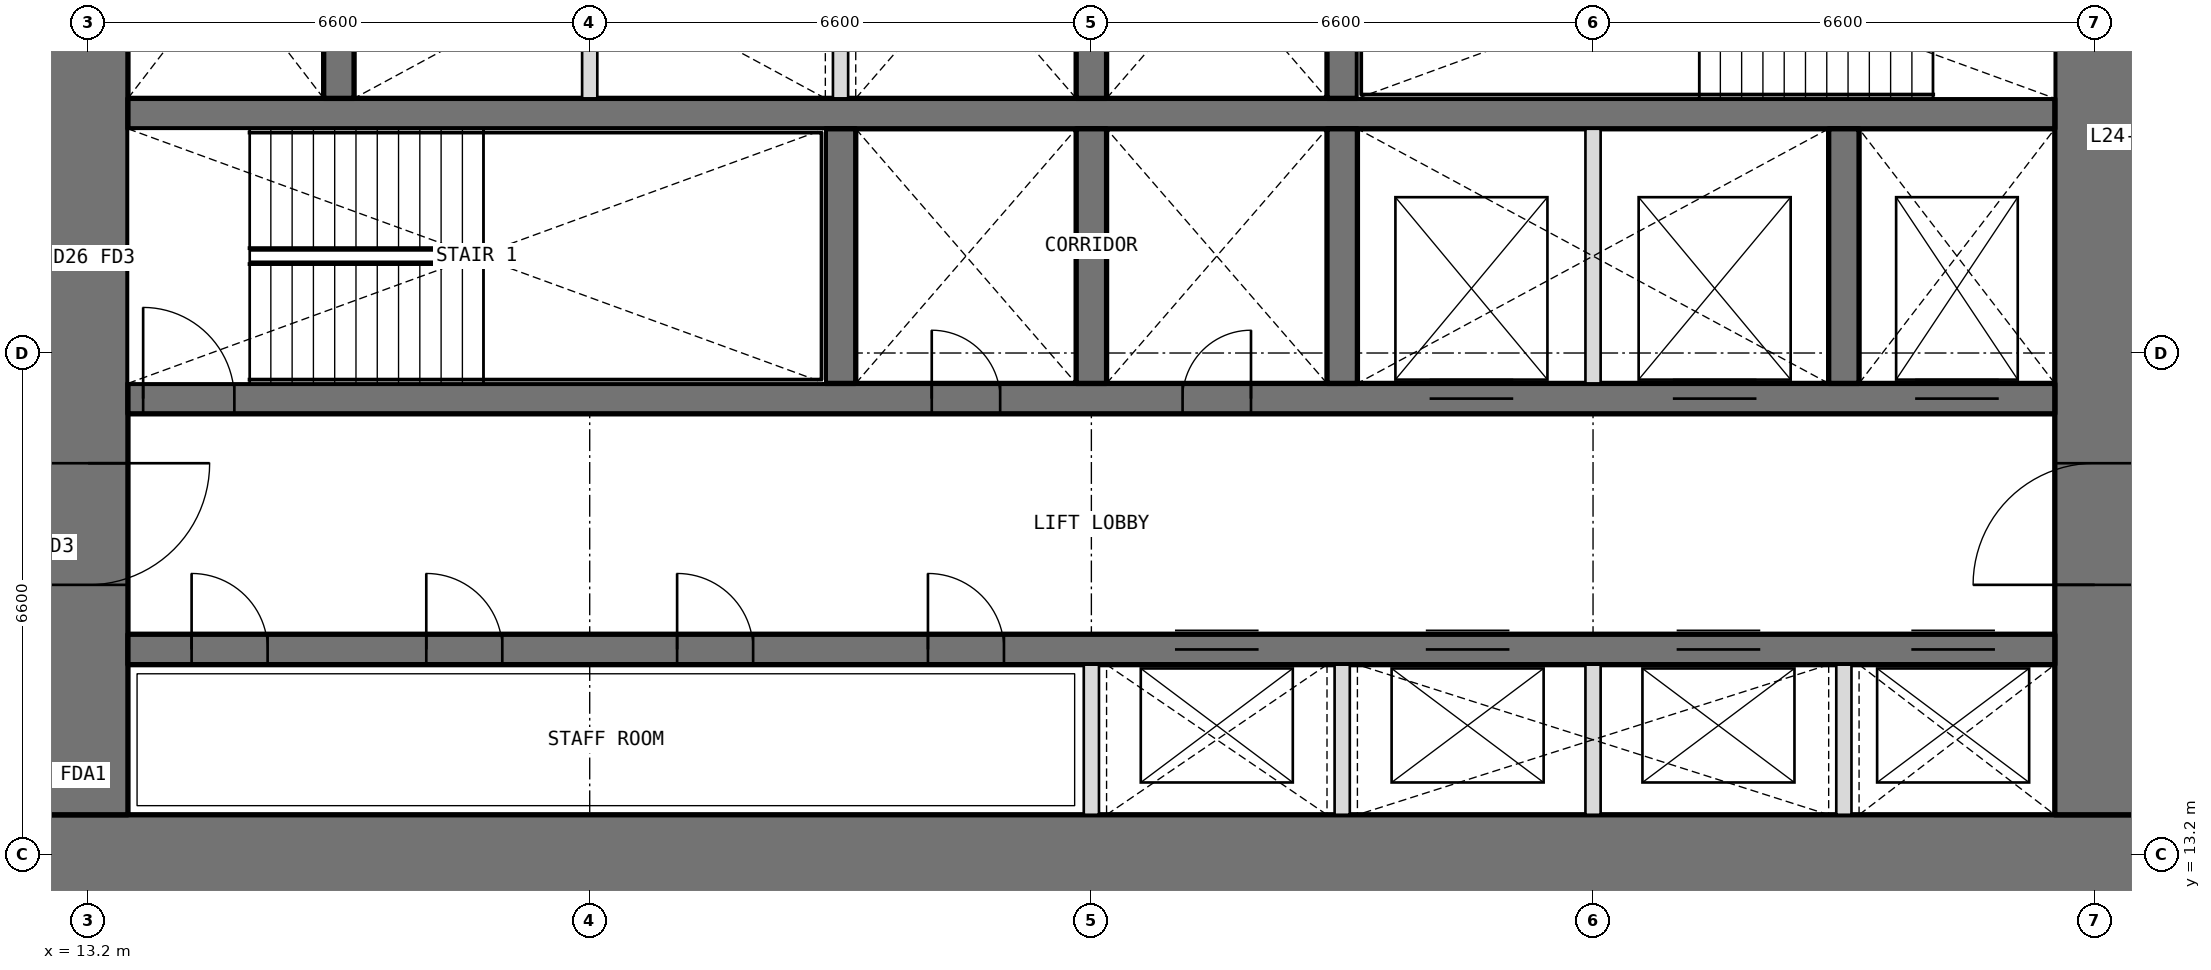
"""IFC4 building model, lengths in metres.
Left out: names, types, materials, properties, quantities, classifications, styles, units other than length and angle.
Written with IfcOpenShell. Run it as: python <this file> out.ifc"""

import sys

from ifc_helpers import new_model, si_unit, direction, frame, frame_2d, origin, place, context, subcontext, project, spatial, rectangle, extrude, element, fill, save


model = new_model("IFC4")
c1 = context("Model", 3, precision=1e-05, world=origin(), true_north=direction((0.0, 1.0)))
c2 = subcontext(c1, "Body", "Model", "MODEL_VIEW")
j1 = project(units=[si_unit("LENGTHUNIT", "METRE"), si_unit("PLANEANGLEUNIT", "RADIAN")], contexts=[c1])
p1 = place(None, origin())
s1 = spatial("IfcSite", under=j1, at=p1, CompositionType="ELEMENT")
p2 = place(p1, origin())
s2 = spatial("IfcBuilding", under=s1, at=p2, CompositionType="ELEMENT")
p3 = place(p2, frame((0.0, 0.0, 107.4)))
s3 = spatial("IfcBuildingStorey", under=s2, at=p3, CompositionType="ELEMENT", Elevation=107.4)
p4 = place(p3, frame((12.675, 13.2, 0.0), z_axis=(0.0, 0.0, 1.0), x_axis=(1.0, 0.0, 0.0)))
e1 = element("IfcWall", 1, at=p4, inside=s3, PredefinedType="SHEAR", context=c2, shape_type="SweptSolid", body=[
    extrude(rectangle(XDim=27.45, YDim=1.05, at=frame_2d((13.725, 0.0))), origin(), (0.0, 0.0, 1.0), 4.2),
])
p5 = place(p3, frame((39.6, 13.725, 0.0), z_axis=(0.0, 0.0, 1.0), x_axis=(0.0, 1.0, 0.0)))
e2 = element("IfcWall", 2, at=p5, inside=s3, PredefinedType="SHEAR", context=c2, shape_type="SweptSolid", body=[
    extrude(rectangle(XDim=18.75, YDim=1.05, at=frame_2d((9.375, 0.0))), origin(), (0.0, 0.0, 1.0), 4.2),
])
p6 = place(p5, frame((3.025, 0.0, 0.0)))
e3 = element("IfcOpeningElement", 3, at=p6, cuts=e2, PredefinedType="OPENING", context=c2, shape_type="SweptSolid", body=[
    extrude(rectangle(XDim=1.6, YDim=2.1, at=frame_2d((0.8, 1.05))), frame((0.0, 0.535, 0.0), z_axis=(0.0, -1.0, 0.0), x_axis=(1.0, 0.0, 0.0)), (0.0, 0.0, 1.0), 1.07),
])
p7 = place(p5, frame((13.825, 0.0, 0.0)))
e4 = element("IfcOpeningElement", 4, at=p7, cuts=e2, PredefinedType="OPENING", context=c2, shape_type="SweptSolid", body=[
    extrude(rectangle(XDim=1.6, YDim=2.1, at=frame_2d((0.8, 1.05))), frame((0.0, 0.535, 0.0), z_axis=(0.0, -1.0, 0.0), x_axis=(1.0, 0.0, 0.0)), (0.0, 0.0, 1.0), 1.07),
])
p8 = place(p3, frame((13.2, 32.475, 0.0), z_axis=(0.0, 0.0, 1.0), x_axis=(0.0, -1.0, 0.0)))
e5 = element("IfcWall", 5, at=p8, inside=s3, PredefinedType="SHEAR", context=c2, shape_type="SweptSolid", body=[
    extrude(rectangle(XDim=18.75, YDim=1.05, at=frame_2d((9.375, 0.0))), origin(), (0.0, 0.0, 1.0), 4.2),
])
p9 = place(p8, frame((14.125, 0.0, 0.0)))
e6 = element("IfcOpeningElement", 6, at=p9, cuts=e5, PredefinedType="OPENING", context=c2, shape_type="SweptSolid", body=[
    extrude(rectangle(XDim=1.6, YDim=2.1, at=frame_2d((0.8, 1.05))), frame((0.0, 0.535, 0.0), z_axis=(0.0, -1.0, 0.0), x_axis=(1.0, 0.0, 0.0)), (0.0, 0.0, 1.0), 1.07),
])
p10 = place(p8, frame((3.325, 0.0, 0.0)))
e7 = element("IfcOpeningElement", 7, at=p10, cuts=e5, PredefinedType="OPENING", context=c2, shape_type="SweptSolid", body=[
    extrude(rectangle(XDim=1.6, YDim=2.1, at=frame_2d((0.8, 1.05))), frame((0.0, 0.535, 0.0), z_axis=(0.0, -1.0, 0.0), x_axis=(1.0, 0.0, 0.0)), (0.0, 0.0, 1.0), 1.07),
])
p11 = place(p3, frame((13.725, 15.9, 0.0), z_axis=(0.0, 0.0, 1.0), x_axis=(1.0, 0.0, 0.0)))
e8 = element("IfcWall", 8, at=p11, inside=s3, PredefinedType="SHEAR", context=c2, shape_type="SweptSolid", body=[
    extrude(rectangle(XDim=25.35, YDim=0.4, at=frame_2d((12.675, 0.0))), origin(), (0.0, 0.0, 1.0), 4.2),
])
p12 = place(p11, frame((0.837, 0.0, 0.0)))
e9 = element("IfcOpeningElement", 9, at=p12, cuts=e8, PredefinedType="OPENING", context=c2, shape_type="SweptSolid", body=[
    extrude(rectangle(XDim=1.0, YDim=2.1, at=frame_2d((0.5, 1.05))), frame((0.0, 0.21, 0.0), z_axis=(0.0, -1.0, 0.0), x_axis=(1.0, 0.0, 0.0)), (0.0, 0.0, 1.0), 0.42),
])
p13 = place(p11, frame((3.925, 0.0, 0.0)))
e10 = element("IfcOpeningElement", 10, at=p13, cuts=e8, PredefinedType="OPENING", context=c2, shape_type="SweptSolid", body=[
    extrude(rectangle(XDim=1.0, YDim=2.1, at=frame_2d((0.5, 1.05))), frame((0.0, 0.21, 0.0), z_axis=(0.0, -1.0, 0.0), x_axis=(1.0, 0.0, 0.0)), (0.0, 0.0, 1.0), 0.42),
])
p14 = place(p11, frame((7.225, 0.0, 0.0)))
e11 = element("IfcOpeningElement", 11, at=p14, cuts=e8, PredefinedType="OPENING", context=c2, shape_type="SweptSolid", body=[
    extrude(rectangle(XDim=1.0, YDim=2.1, at=frame_2d((0.5, 1.05))), frame((0.0, 0.21, 0.0), z_axis=(0.0, -1.0, 0.0), x_axis=(1.0, 0.0, 0.0)), (0.0, 0.0, 1.0), 0.42),
])
p15 = place(p11, frame((10.525, 0.0, 0.0)))
e12 = element("IfcOpeningElement", 12, at=p15, cuts=e8, PredefinedType="OPENING", context=c2, shape_type="SweptSolid", body=[
    extrude(rectangle(XDim=1.0, YDim=2.1, at=frame_2d((0.5, 1.05))), frame((0.0, 0.21, 0.0), z_axis=(0.0, -1.0, 0.0), x_axis=(1.0, 0.0, 0.0)), (0.0, 0.0, 1.0), 0.42),
])
p16 = place(p11, frame((13.775, 0.0, 0.0)))
e13 = element("IfcOpeningElement", 13, at=p16, cuts=e8, PredefinedType="OPENING", context=c2, shape_type="SweptSolid", body=[
    extrude(rectangle(XDim=1.1, YDim=2.1, at=frame_2d((0.55, 1.05))), frame((0.0, 0.21, 0.0), z_axis=(0.0, -1.0, 0.0), x_axis=(1.0, 0.0, 0.0)), (0.0, 0.0, 1.0), 0.42),
])
p17 = place(p11, frame((17.075, 0.0, 0.0)))
e14 = element("IfcOpeningElement", 14, at=p17, cuts=e8, PredefinedType="OPENING", context=c2, shape_type="SweptSolid", body=[
    extrude(rectangle(XDim=1.1, YDim=2.1, at=frame_2d((0.55, 1.05))), frame((0.0, 0.21, 0.0), z_axis=(0.0, -1.0, 0.0), x_axis=(1.0, 0.0, 0.0)), (0.0, 0.0, 1.0), 0.42),
])
p18 = place(p11, frame((20.375, 0.0, 0.0)))
e15 = element("IfcOpeningElement", 15, at=p18, cuts=e8, PredefinedType="OPENING", context=c2, shape_type="SweptSolid", body=[
    extrude(rectangle(XDim=1.1, YDim=2.1, at=frame_2d((0.55, 1.05))), frame((0.0, 0.21, 0.0), z_axis=(0.0, -1.0, 0.0), x_axis=(1.0, 0.0, 0.0)), (0.0, 0.0, 1.0), 0.42),
])
p19 = place(p11, frame((23.462, 0.0, 0.0)))
e16 = element("IfcOpeningElement", 16, at=p19, cuts=e8, PredefinedType="OPENING", context=c2, shape_type="SweptSolid", body=[
    extrude(rectangle(XDim=1.1, YDim=2.1, at=frame_2d((0.55, 1.05))), frame((0.0, 0.21, 0.0), z_axis=(0.0, -1.0, 0.0), x_axis=(1.0, 0.0, 0.0)), (0.0, 0.0, 1.0), 0.42),
])
p20 = place(p3, frame((13.725, 19.2, 0.0), z_axis=(0.0, 0.0, 1.0), x_axis=(1.0, 0.0, 0.0)))
e17 = element("IfcWall", 17, at=p20, inside=s3, PredefinedType="SHEAR", context=c2, shape_type="SweptSolid", body=[
    extrude(rectangle(XDim=25.35, YDim=0.4, at=frame_2d((12.675, 0.0))), origin(), (0.0, 0.0, 1.0), 4.2),
])
p21 = place(p20, frame((10.575, 0.0, 0.0)))
e18 = element("IfcOpeningElement", 18, at=p21, cuts=e17, PredefinedType="OPENING", context=c2, shape_type="SweptSolid", body=[
    extrude(rectangle(XDim=0.9, YDim=2.1, at=frame_2d((0.45, 1.05))), frame((0.0, 0.21, 0.0), z_axis=(0.0, -1.0, 0.0), x_axis=(1.0, 0.0, 0.0)), (0.0, 0.0, 1.0), 0.42),
])
p22 = place(p20, frame((13.875, 0.0, 0.0)))
e19 = element("IfcOpeningElement", 19, at=p22, cuts=e17, PredefinedType="OPENING", context=c2, shape_type="SweptSolid", body=[
    extrude(rectangle(XDim=0.9, YDim=2.1, at=frame_2d((0.45, 1.05))), frame((0.0, 0.21, 0.0), z_axis=(0.0, -1.0, 0.0), x_axis=(1.0, 0.0, 0.0)), (0.0, 0.0, 1.0), 0.42),
])
p23 = place(p20, frame((0.2, 0.0, 0.0)))
e20 = element("IfcOpeningElement", 20, at=p23, cuts=e17, PredefinedType="OPENING", context=c2, shape_type="SweptSolid", body=[
    extrude(rectangle(XDim=1.2, YDim=2.1, at=frame_2d((0.6, 1.05))), frame((0.0, 0.21, 0.0), z_axis=(0.0, -1.0, 0.0), x_axis=(1.0, 0.0, 0.0)), (0.0, 0.0, 1.0), 0.42),
])
p24 = place(p20, frame((23.512, 0.0, 0.0)))
e21 = element("IfcOpeningElement", 21, at=p24, cuts=e17, PredefinedType="OPENING", context=c2, shape_type="SweptSolid", body=[
    extrude(rectangle(XDim=1.1, YDim=2.1, at=frame_2d((0.55, 1.05))), frame((0.0, 0.21, 0.0), z_axis=(0.0, -1.0, 0.0), x_axis=(1.0, 0.0, 0.0)), (0.0, 0.0, 1.0), 0.42),
])
p25 = place(p20, frame((17.125, 0.0, 0.0)))
e22 = element("IfcOpeningElement", 22, at=p25, cuts=e17, PredefinedType="OPENING", context=c2, shape_type="SweptSolid", body=[
    extrude(rectangle(XDim=1.1, YDim=2.1, at=frame_2d((0.55, 1.05))), frame((0.0, 0.21, 0.0), z_axis=(0.0, -1.0, 0.0), x_axis=(1.0, 0.0, 0.0)), (0.0, 0.0, 1.0), 0.42),
])
p26 = place(p20, frame((20.325, 0.0, 0.0)))
e23 = element("IfcOpeningElement", 23, at=p26, cuts=e17, PredefinedType="OPENING", context=c2, shape_type="SweptSolid", body=[
    extrude(rectangle(XDim=1.1, YDim=2.1, at=frame_2d((0.55, 1.05))), frame((0.0, 0.21, 0.0), z_axis=(0.0, -1.0, 0.0), x_axis=(1.0, 0.0, 0.0)), (0.0, 0.0, 1.0), 0.42),
])
p27 = place(p3, frame((13.725, 22.95, 0.0), z_axis=(0.0, 0.0, 1.0), x_axis=(1.0, 0.0, 0.0)))
e24 = element("IfcWall", 24, at=p27, inside=s3, PredefinedType="SHEAR", context=c2, shape_type="SweptSolid", body=[
    extrude(rectangle(XDim=25.35, YDim=0.4, at=frame_2d((12.675, 0.0))), origin(), (0.0, 0.0, 1.0), 4.2),
])
for number, where, z_axis, x_axis in (
    (25, (23.1, 19.4, 0.0), (0.0, 0.0, 1.0), (0.0, 1.0, 0.0)),
    (26, (26.4, 19.4, 0.0), (0.0, 0.0, 1.0), (0.0, 1.0, 0.0)),
    (27, (29.7, 19.4, 0.0), (0.0, 0.0, 1.0), (0.0, 1.0, 0.0)),
    (28, (36.3, 19.4, 0.0), (0.0, 0.0, 1.0), (0.0, 1.0, 0.0)),
    (29, (16.5, 23.15, 0.0), (0.0, 0.0, 1.0), (0.0, 1.0, 0.0)),
    (30, (26.4, 23.15, 0.0), (0.0, 0.0, 1.0), (0.0, 1.0, 0.0)),
    (31, (29.7, 23.15, 0.0), (0.0, 0.0, 1.0), (0.0, 1.0, 0.0)),
):
    element("IfcWall", number, at=place(p3, frame(where, z_axis=z_axis, x_axis=x_axis)), inside=s3, PredefinedType="SHEAR", context=c2, shape_type="SweptSolid", body=[
        extrude(rectangle(XDim=3.35, YDim=0.4, at=frame_2d((1.675, 0.0))), origin(), (0.0, 0.0, 1.0), 4.2),
    ])
for number, where, z_axis, x_axis in (
    (32, (26.4, 13.725, 0.0), (0.0, 0.0, 1.0), (0.0, 1.0, 0.0)),
    (33, (29.7, 13.725, 0.0), (0.0, 0.0, 1.0), (0.0, 1.0, 0.0)),
    (34, (33.0, 13.725, 0.0), (0.0, 0.0, 1.0), (0.0, 1.0, 0.0)),
    (35, (36.3, 13.725, 0.0), (0.0, 0.0, 1.0), (0.0, 1.0, 0.0)),
):
    element("IfcWall", number, at=place(p3, frame(where, z_axis=z_axis, x_axis=x_axis)), inside=s3, PredefinedType="PARTITIONING", context=c2, shape_type="SweptSolid", body=[
        extrude(rectangle(XDim=1.975, YDim=0.2, at=frame_2d((0.987, 0.0))), origin(), (0.0, 0.0, 1.0), 4.2),
    ])
for number, where, z_axis, x_axis in (
    (36, (33.0, 19.4, 0.0), (0.0, 0.0, 1.0), (0.0, 1.0, 0.0)),
    (37, (19.8, 23.15, 0.0), (0.0, 0.0, 1.0), (0.0, 1.0, 0.0)),
    (38, (23.1, 23.15, 0.0), (0.0, 0.0, 1.0), (0.0, 1.0, 0.0)),
):
    element("IfcWall", number, at=place(p3, frame(where, z_axis=z_axis, x_axis=x_axis)), inside=s3, PredefinedType="PARTITIONING", context=c2, shape_type="SweptSolid", body=[
        extrude(rectangle(XDim=3.35, YDim=0.2, at=frame_2d((1.675, 0.0))), origin(), (0.0, 0.0, 1.0), 4.2),
    ])
p28 = place(p21, origin())
e39 = element("IfcDoor", 39, at=p28, inside=s3, OperationType="SINGLE_SWING_LEFT", PredefinedType="DOOR", context=c2, shape_type="SweptSolid", body=[
    extrude(rectangle(XDim=0.9, YDim=2.1, at=frame_2d((0.45, 1.05))), frame((0.0, 0.025, 0.0), z_axis=(0.0, -1.0, 0.0), x_axis=(1.0, 0.0, 0.0)), (0.0, 0.0, 1.0), 0.05),
])
fill(e18, e39)
p29 = place(p22, origin())
e40 = element("IfcDoor", 40, at=p29, inside=s3, OperationType="SINGLE_SWING_RIGHT", PredefinedType="DOOR", context=c2, shape_type="SweptSolid", body=[
    extrude(rectangle(XDim=0.9, YDim=2.1, at=frame_2d((0.45, 1.05))), frame((0.0, 0.025, 0.0), z_axis=(0.0, -1.0, 0.0), x_axis=(1.0, 0.0, 0.0)), (0.0, 0.0, 1.0), 0.05),
])
fill(e19, e40)
p30 = place(p12, origin())
e41 = element("IfcDoor", 41, at=p30, inside=s3, OperationType="SINGLE_SWING_LEFT", PredefinedType="DOOR", context=c2, shape_type="SweptSolid", body=[
    extrude(rectangle(XDim=1.0, YDim=2.1, at=frame_2d((0.5, 1.05))), frame((0.0, 0.025, 0.0), z_axis=(0.0, -1.0, 0.0), x_axis=(1.0, 0.0, 0.0)), (0.0, 0.0, 1.0), 0.05),
])
fill(e9, e41)
p31 = place(p13, origin())
e42 = element("IfcDoor", 42, at=p31, inside=s3, OperationType="SINGLE_SWING_LEFT", PredefinedType="DOOR", context=c2, shape_type="SweptSolid", body=[
    extrude(rectangle(XDim=1.0, YDim=2.1, at=frame_2d((0.5, 1.05))), frame((0.0, 0.025, 0.0), z_axis=(0.0, -1.0, 0.0), x_axis=(1.0, 0.0, 0.0)), (0.0, 0.0, 1.0), 0.05),
])
fill(e10, e42)
p32 = place(p14, origin())
e43 = element("IfcDoor", 43, at=p32, inside=s3, OperationType="SINGLE_SWING_LEFT", PredefinedType="DOOR", context=c2, shape_type="SweptSolid", body=[
    extrude(rectangle(XDim=1.0, YDim=2.1, at=frame_2d((0.5, 1.05))), frame((0.0, 0.025, 0.0), z_axis=(0.0, -1.0, 0.0), x_axis=(1.0, 0.0, 0.0)), (0.0, 0.0, 1.0), 0.05),
])
fill(e11, e43)
p33 = place(p15, origin())
e44 = element("IfcDoor", 44, at=p33, inside=s3, OperationType="SINGLE_SWING_LEFT", PredefinedType="DOOR", context=c2, shape_type="SweptSolid", body=[
    extrude(rectangle(XDim=1.0, YDim=2.1, at=frame_2d((0.5, 1.05))), frame((0.0, 0.025, 0.0), z_axis=(0.0, -1.0, 0.0), x_axis=(1.0, 0.0, 0.0)), (0.0, 0.0, 1.0), 0.05),
])
fill(e12, e44)
p34 = place(p23, origin())
e45 = element("IfcDoor", 45, at=p34, inside=s3, OperationType="SINGLE_SWING_LEFT", PredefinedType="DOOR", context=c2, shape_type="SweptSolid", body=[
    extrude(rectangle(XDim=1.2, YDim=2.1, at=frame_2d((0.6, 1.05))), frame((0.0, 0.025, 0.0), z_axis=(0.0, -1.0, 0.0), x_axis=(1.0, 0.0, 0.0)), (0.0, 0.0, 1.0), 0.05),
])
fill(e20, e45)
p35 = place(p9, origin())
e46 = element("IfcDoor", 46, at=p35, inside=s3, OperationType="DOUBLE_DOOR_DOUBLE_SWING", PredefinedType="DOOR", context=c2, shape_type="SweptSolid", body=[
    extrude(rectangle(XDim=1.6, YDim=2.1, at=frame_2d((0.8, 1.05))), frame((0.0, 0.025, 0.0), z_axis=(0.0, -1.0, 0.0), x_axis=(1.0, 0.0, 0.0)), (0.0, 0.0, 1.0), 0.05),
])
fill(e6, e46)
p36 = place(p6, origin())
e47 = element("IfcDoor", 47, at=p36, inside=s3, OperationType="DOUBLE_DOOR_DOUBLE_SWING", PredefinedType="DOOR", context=c2, shape_type="SweptSolid", body=[
    extrude(rectangle(XDim=1.6, YDim=2.1, at=frame_2d((0.8, 1.05))), frame((0.0, 0.025, 0.0), z_axis=(0.0, -1.0, 0.0), x_axis=(1.0, 0.0, 0.0)), (0.0, 0.0, 1.0), 0.05),
])
fill(e3, e47)
p37 = place(p16, origin())
e48 = element("IfcDoor", 48, at=p37, inside=s3, OperationType="DOUBLE_DOOR_SLIDING", PredefinedType="DOOR", context=c2, shape_type="SweptSolid", body=[
    extrude(rectangle(XDim=1.1, YDim=2.1, at=frame_2d((0.55, 1.05))), frame((0.0, 0.025, 0.0), z_axis=(0.0, -1.0, 0.0), x_axis=(1.0, 0.0, 0.0)), (0.0, 0.0, 1.0), 0.05),
])
fill(e13, e48)
p38 = place(p17, origin())
e49 = element("IfcDoor", 49, at=p38, inside=s3, OperationType="DOUBLE_DOOR_SLIDING", PredefinedType="DOOR", context=c2, shape_type="SweptSolid", body=[
    extrude(rectangle(XDim=1.1, YDim=2.1, at=frame_2d((0.55, 1.05))), frame((0.0, 0.025, 0.0), z_axis=(0.0, -1.0, 0.0), x_axis=(1.0, 0.0, 0.0)), (0.0, 0.0, 1.0), 0.05),
])
fill(e14, e49)
p39 = place(p18, origin())
e50 = element("IfcDoor", 50, at=p39, inside=s3, OperationType="DOUBLE_DOOR_SLIDING", PredefinedType="DOOR", context=c2, shape_type="SweptSolid", body=[
    extrude(rectangle(XDim=1.1, YDim=2.1, at=frame_2d((0.55, 1.05))), frame((0.0, 0.025, 0.0), z_axis=(0.0, -1.0, 0.0), x_axis=(1.0, 0.0, 0.0)), (0.0, 0.0, 1.0), 0.05),
])
fill(e15, e50)
p40 = place(p19, origin())
e51 = element("IfcDoor", 51, at=p40, inside=s3, OperationType="DOUBLE_DOOR_SLIDING", PredefinedType="DOOR", context=c2, shape_type="SweptSolid", body=[
    extrude(rectangle(XDim=1.1, YDim=2.1, at=frame_2d((0.55, 1.05))), frame((0.0, 0.025, 0.0), z_axis=(0.0, -1.0, 0.0), x_axis=(1.0, 0.0, 0.0)), (0.0, 0.0, 1.0), 0.05),
])
fill(e16, e51)
p41 = place(p24, origin())
e52 = element("IfcDoor", 52, at=p41, inside=s3, OperationType="DOUBLE_DOOR_SLIDING", PredefinedType="DOOR", context=c2, shape_type="SweptSolid", body=[
    extrude(rectangle(XDim=1.1, YDim=2.1, at=frame_2d((0.55, 1.05))), frame((0.0, 0.025, 0.0), z_axis=(0.0, -1.0, 0.0), x_axis=(1.0, 0.0, 0.0)), (0.0, 0.0, 1.0), 0.05),
])
fill(e21, e52)
p42 = place(p25, origin())
e53 = element("IfcDoor", 53, at=p42, inside=s3, OperationType="DOUBLE_DOOR_SLIDING", PredefinedType="DOOR", context=c2, shape_type="SweptSolid", body=[
    extrude(rectangle(XDim=1.1, YDim=2.1, at=frame_2d((0.55, 1.05))), frame((0.0, 0.025, 0.0), z_axis=(0.0, -1.0, 0.0), x_axis=(1.0, 0.0, 0.0)), (0.0, 0.0, 1.0), 0.05),
])
fill(e22, e53)
p43 = place(p26, origin())
e54 = element("IfcDoor", 54, at=p43, inside=s3, OperationType="DOUBLE_DOOR_SLIDING", PredefinedType="DOOR", context=c2, shape_type="SweptSolid", body=[
    extrude(rectangle(XDim=1.1, YDim=2.1, at=frame_2d((0.55, 1.05))), frame((0.0, 0.025, 0.0), z_axis=(0.0, -1.0, 0.0), x_axis=(1.0, 0.0, 0.0)), (0.0, 0.0, 1.0), 0.05),
])
fill(e23, e54)
save(model, sys.argv[1])
